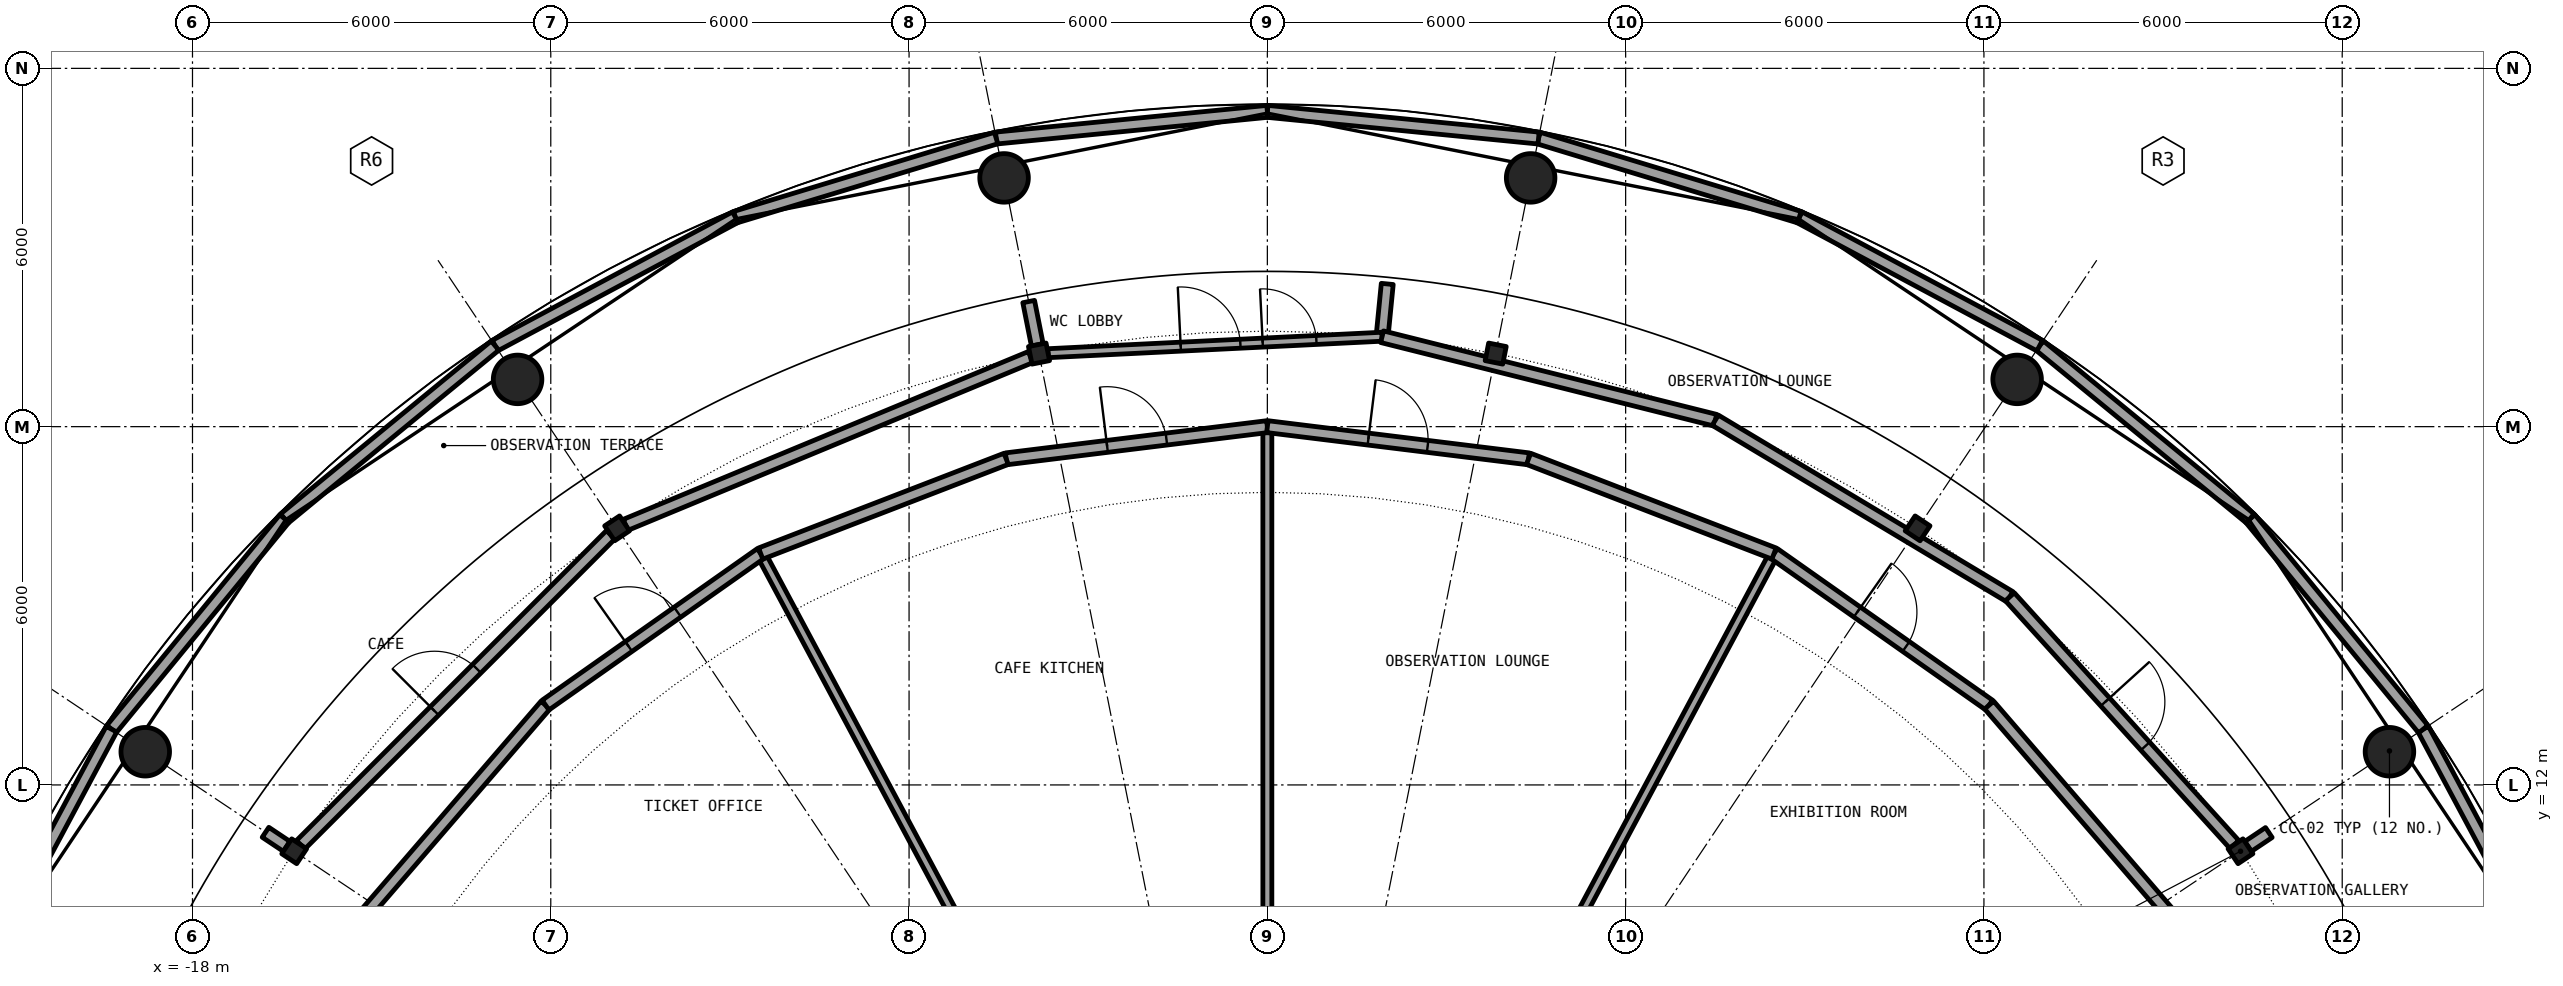
"""IFC4 building model, lengths in metres.
Left out: names, types, materials, properties, quantities, classifications, styles, units other than length and angle.
Written with IfcOpenShell. Run it as: python <this file> out.ifc"""

import sys

from ifc_helpers import new_model, si_unit, direction, frame, frame_2d, origin, origin_2d, place, context, subcontext, project, spatial, rectangle, hollow_circle, i_section, extrude, element, fill, save


model = new_model("IFC4")
c1 = context("Model", 3, precision=1e-05, world=origin(), true_north=direction((0.0, 1.0)))
c2 = subcontext(c1, "Body", "Model", "MODEL_VIEW")
j1 = project(units=[si_unit("LENGTHUNIT", "METRE"), si_unit("PLANEANGLEUNIT", "RADIAN")], contexts=[c1])
p1 = place(None, origin())
s1 = spatial("IfcSite", under=j1, at=p1, CompositionType="ELEMENT")
p2 = place(p1, origin())
s2 = spatial("IfcBuilding", under=s1, at=p2, CompositionType="ELEMENT")
p3 = place(p2, frame((0.0, 0.0, 255.4)))
s3 = spatial("IfcBuildingStorey", under=s2, at=p3, CompositionType="ELEMENT", Elevation=255.4)
for number, where, z_axis, x_axis in (
    (1, (18.791, 12.556, 0.0), (0.0, 0.0, 1.0), (1.0, 0.0, 0.0)),
    (2, (12.556, 18.791, 0.0), (0.0, 0.0, 1.0), (1.0, 0.0, 0.0)),
    (3, (4.409, 22.166, 0.0), (0.0, 0.0, 1.0), (1.0, 0.0, 0.0)),
    (4, (-4.409, 22.166, 0.0), (0.0, 0.0, 1.0), (1.0, 0.0, 0.0)),
    (5, (-12.556, 18.791, 0.0), (0.0, 0.0, 1.0), (1.0, 0.0, 0.0)),
    (6, (-18.791, 12.556, 0.0), (0.0, 0.0, 1.0), (1.0, 0.0, 0.0)),
):
    element("IfcColumn", number, at=place(p3, frame(where, z_axis=z_axis, x_axis=x_axis)), inside=s3, PredefinedType="COLUMN", context=c2, shape_type="SweptSolid", body=[
        extrude(hollow_circle(Radius=0.406, WallThickness=0.03, at=origin_2d()), origin(), (0.0, 0.0, 1.0), 6.1),
    ])
for number, where, z_axis, x_axis in (
    (7, (16.297, 10.889, 0.0), (0.0, 0.0, 1.0), (0.831, 0.556, 0.0)),
    (8, (10.889, 16.297, 0.0), (0.0, 0.0, 1.0), (0.556, 0.831, 0.0)),
    (9, (3.824, 19.223, 0.0), (0.0, 0.0, 1.0), (0.195, 0.981, 0.0)),
    (10, (-3.824, 19.223, 0.0), (0.0, 0.0, 1.0), (-0.195, 0.981, 0.0)),
    (11, (-10.889, 16.297, 0.0), (0.0, 0.0, 1.0), (-0.556, 0.831, 0.0)),
    (12, (-16.297, 10.889, 0.0), (0.0, 0.0, 1.0), (-0.831, 0.556, 0.0)),
):
    element("IfcColumn", number, at=place(p3, frame(where, z_axis=z_axis, x_axis=x_axis)), inside=s3, PredefinedType="COLUMN", context=c2, shape_type="SweptSolid", body=[
        extrude(i_section(OverallWidth=0.3, OverallDepth=0.3, WebThickness=0.011, FlangeThickness=0.019, FilletRadius=0.027, at=origin_2d()), origin(), (0.0, 0.0, 1.0), 6.1),
    ])
p4 = place(p3, frame((21.508, 8.909, 6.1), z_axis=(0.0, 0.0, 1.0), x_axis=(-0.471334945511, 0.881954289711, 0.0)))
e13 = element("IfcWall", 13, at=p4, inside=s3, PredefinedType="PARAPET", context=c2, shape_type="SweptSolid", body=[
    extrude(rectangle(XDim=4.564, YDim=0.2, at=frame_2d((2.282, 0.0))), origin(), (0.0, 0.0, 1.0), 1.1),
])
for number, where, z_axis, x_axis in (
    (14, (19.357, 12.934, 6.1), (0.0, 0.0, 1.0), (-0.635, 0.773, 0.0)),
    (15, (16.461, 16.461, 6.1), (0.0, 0.0, 1.0), (-0.773, 0.635, 0.0)),
):
    element("IfcWall", number, at=place(p3, frame(where, z_axis=z_axis, x_axis=x_axis)), inside=s3, PredefinedType="PARAPET", context=c2, shape_type="SweptSolid", body=[
        extrude(rectangle(XDim=4.563, YDim=0.2, at=frame_2d((2.282, 0.0))), origin(), (0.0, 0.0, 1.0), 1.1),
    ])
p5 = place(p3, frame((12.934, 19.357, 6.1), z_axis=(0.0, 0.0, 1.0), x_axis=(-0.881954289711, 0.471334945511, 0.0)))
e16 = element("IfcWall", 16, at=p5, inside=s3, PredefinedType="PARAPET", context=c2, shape_type="SweptSolid", body=[
    extrude(rectangle(XDim=4.564, YDim=0.2, at=frame_2d((2.282, 0.0))), origin(), (0.0, 0.0, 1.0), 1.1),
])
p6 = place(p3, frame((8.909, 21.508, 6.1), z_axis=(0.0, 0.0, 1.0), x_axis=(-0.956924910545, 0.29033552242, 0.0)))
e17 = element("IfcWall", 17, at=p6, inside=s3, PredefinedType="PARAPET", context=c2, shape_type="SweptSolid", body=[
    extrude(rectangle(XDim=4.563, YDim=0.2, at=frame_2d((2.282, 0.0))), origin(), (0.0, 0.0, 1.0), 1.1),
])
for number, where, z_axis, x_axis in (
    (18, (4.542, 22.833, 6.1), (0.0, 0.0, 1.0), (-0.995, 0.098, 0.0)),
    (19, (0.0, 23.28, 6.1), (0.0, 0.0, 1.0), (-0.995, -0.098, 0.0)),
):
    element("IfcWall", number, at=place(p3, frame(where, z_axis=z_axis, x_axis=x_axis)), inside=s3, PredefinedType="PARAPET", context=c2, shape_type="SweptSolid", body=[
        extrude(rectangle(XDim=4.564, YDim=0.2, at=frame_2d((2.282, 0.0))), origin(), (0.0, 0.0, 1.0), 1.1),
    ])
p7 = place(p3, frame((-4.542, 22.833, 6.1), z_axis=(0.0, 0.0, 1.0), x_axis=(-0.956924910545, -0.29033552242, 0.0)))
e20 = element("IfcWall", 20, at=p7, inside=s3, PredefinedType="PARAPET", context=c2, shape_type="SweptSolid", body=[
    extrude(rectangle(XDim=4.563, YDim=0.2, at=frame_2d((2.282, 0.0))), origin(), (0.0, 0.0, 1.0), 1.1),
])
p8 = place(p3, frame((-8.909, 21.508, 6.1), z_axis=(0.0, 0.0, 1.0), x_axis=(-0.881954289711, -0.471334945511, 0.0)))
e21 = element("IfcWall", 21, at=p8, inside=s3, PredefinedType="PARAPET", context=c2, shape_type="SweptSolid", body=[
    extrude(rectangle(XDim=4.564, YDim=0.2, at=frame_2d((2.282, 0.0))), origin(), (0.0, 0.0, 1.0), 1.1),
])
for number, where, z_axis, x_axis in (
    (22, (-12.934, 19.357, 6.1), (0.0, 0.0, 1.0), (-0.773, -0.635, 0.0)),
    (23, (-16.461, 16.461, 6.1), (0.0, 0.0, 1.0), (-0.635, -0.773, 0.0)),
):
    element("IfcWall", number, at=place(p3, frame(where, z_axis=z_axis, x_axis=x_axis)), inside=s3, PredefinedType="PARAPET", context=c2, shape_type="SweptSolid", body=[
        extrude(rectangle(XDim=4.563, YDim=0.2, at=frame_2d((2.282, 0.0))), origin(), (0.0, 0.0, 1.0), 1.1),
    ])
p9 = place(p3, frame((-19.357, 12.934, 6.1), z_axis=(0.0, 0.0, 1.0), x_axis=(-0.471334945511, -0.881954289711, 0.0)))
e24 = element("IfcWall", 24, at=p9, inside=s3, PredefinedType="PARAPET", context=c2, shape_type="SweptSolid", body=[
    extrude(rectangle(XDim=4.564, YDim=0.2, at=frame_2d((2.282, 0.0))), origin(), (0.0, 0.0, 1.0), 1.1),
])
p10 = place(p3, frame((-3.997, 20.095, 0.0), z_axis=(0.0, 0.0, 1.0), x_axis=(0.194908923467, -0.98082134538, 0.0)))
e25 = element("IfcWall", 25, at=p10, inside=s3, PredefinedType="PARTITIONING", context=c2, shape_type="SweptSolid", body=[
    extrude(rectangle(XDim=0.739, YDim=0.2, at=frame_2d((0.37, 0.0))), origin(), (0.0, 0.0, 1.0), 5.75),
])
p11 = place(p3, frame((-16.777, 11.207, 0.0), z_axis=(0.0, 0.0, 1.0), x_axis=(0.831962011971, -0.554832596949, 0.0)))
e26 = element("IfcWall", 26, at=p11, inside=s3, PredefinedType="PARTITIONING", context=c2, shape_type="SweptSolid", body=[
    extrude(rectangle(XDim=0.426, YDim=0.2, at=frame_2d((0.213, 0.0))), origin(), (0.0, 0.0, 1.0), 5.75),
])
p12 = place(p3, frame((-8.485, 15.875, 0.0), z_axis=(0.0, 0.0, 1.0), x_axis=(0.471384277318, -0.881927923981, 0.0)))
e27 = element("IfcWall", 27, at=p12, inside=s3, PredefinedType="PARTITIONING", context=c2, shape_type="SweptSolid", body=[
    extrude(rectangle(XDim=10.281, YDim=0.15, at=frame_2d((5.14, 0.0))), origin(), (0.0, 0.0, 1.0), 5.75),
])
p13 = place(p3, frame((0.0, 7.72, 0.0), z_axis=(0.0, 0.0, 1.0), x_axis=(0.0, 1.0, 0.0)))
e28 = element("IfcWall", 28, at=p13, inside=s3, PredefinedType="PARTITIONING", context=c2, shape_type="SweptSolid", body=[
    extrude(rectangle(XDim=10.28, YDim=0.15, at=frame_2d((5.14, 0.0))), origin(), (0.0, 0.0, 1.0), 5.75),
])
p14 = place(p3, frame((1.921, 19.506, 0.0), z_axis=(0.0, 0.0, 1.0), x_axis=(0.098142687883, 0.995172353321, 0.0)))
e29 = element("IfcWall", 29, at=p14, inside=s3, PredefinedType="PARTITIONING", context=c2, shape_type="SweptSolid", body=[
    extrude(rectangle(XDim=0.888, YDim=0.2, at=frame_2d((0.444, 0.0))), origin(), (0.0, 0.0, 1.0), 5.75),
])
p15 = place(p3, frame((3.639, 6.808, 0.0), z_axis=(0.0, 0.0, 1.0), x_axis=(0.471384277318, 0.881927923981, 0.0)))
e30 = element("IfcWall", 30, at=p15, inside=s3, PredefinedType="PARTITIONING", context=c2, shape_type="SweptSolid", body=[
    extrude(rectangle(XDim=10.281, YDim=0.15, at=frame_2d((5.14, 0.0))), origin(), (0.0, 0.0, 1.0), 5.75),
])
p16 = place(p3, frame((16.423, 10.97, 0.0), z_axis=(0.0, 0.0, 1.0), x_axis=(0.830972164162, 0.556313996218, 0.0)))
e31 = element("IfcWall", 31, at=p16, inside=s3, PredefinedType="PARTITIONING", context=c2, shape_type="SweptSolid", body=[
    extrude(rectangle(XDim=0.419, YDim=0.2, at=frame_2d((0.209, 0.0))), origin(), (0.0, 0.0, 1.0), 5.75),
])
p17 = place(p3, frame((-15.613, 9.25, 0.0), z_axis=(0.0, 0.0, 1.0), x_axis=(0.653146301984, 0.757231740093, 0.0)))
e32 = element("IfcWall", 32, at=p17, inside=s3, PredefinedType="PARTITIONING", context=c2, shape_type="SweptSolid", body=[
    extrude(rectangle(XDim=5.397, YDim=0.2, at=frame_2d((2.699, 0.0))), origin(), (0.0, 0.0, 1.0), 5.75),
])
p18 = place(p3, frame((-12.088, 13.337, 0.0), z_axis=(0.0, 0.0, 1.0), x_axis=(0.817507922666, 0.575917352038, 0.0)))
e33 = element("IfcWall", 33, at=p18, inside=s3, PredefinedType="PARTITIONING", context=c2, shape_type="SweptSolid", body=[
    extrude(rectangle(XDim=4.407, YDim=0.2, at=frame_2d((2.204, 0.0))), origin(), (0.0, 0.0, 1.0), 5.75),
])
p19 = place(p18, frame((1.704, 0.0, 0.0)))
e34 = element("IfcOpeningElement", 34, at=p19, cuts=e33, PredefinedType="OPENING", context=c2, shape_type="SweptSolid", body=[
    extrude(rectangle(XDim=1.0, YDim=2.3, at=frame_2d((0.5, 1.15))), frame((0.0, 0.11, 0.0), z_axis=(0.0, -1.0, 0.0), x_axis=(1.0, 0.0, 0.0)), (0.0, 0.0, 1.0), 0.22),
])
p20 = place(p3, frame((-4.374, 17.461, 0.0), z_axis=(0.0, 0.0, 1.0), x_axis=(0.992491158779, 0.122316391973, 0.0)))
e35 = element("IfcWall", 35, at=p20, inside=s3, PredefinedType="PARTITIONING", context=c2, shape_type="SweptSolid", body=[
    extrude(rectangle(XDim=4.407, YDim=0.2, at=frame_2d((2.204, 0.0))), origin(), (0.0, 0.0, 1.0), 5.75),
])
p21 = place(p20, frame((1.704, 0.0, 0.0)))
e36 = element("IfcOpeningElement", 36, at=p21, cuts=e35, PredefinedType="OPENING", context=c2, shape_type="SweptSolid", body=[
    extrude(rectangle(XDim=1.0, YDim=2.3, at=frame_2d((0.5, 1.15))), frame((0.0, 0.11, 0.0), z_axis=(0.0, -1.0, 0.0), x_axis=(1.0, 0.0, 0.0)), (0.0, 0.0, 1.0), 0.22),
])
p22 = place(p3, frame((0.0, 18.0, 0.0), z_axis=(0.0, 0.0, 1.0), x_axis=(0.992491158779, -0.122316391973, 0.0)))
e37 = element("IfcWall", 37, at=p22, inside=s3, PredefinedType="PARTITIONING", context=c2, shape_type="SweptSolid", body=[
    extrude(rectangle(XDim=4.407, YDim=0.2, at=frame_2d((2.204, 0.0))), origin(), (0.0, 0.0, 1.0), 5.75),
])
p23 = place(p22, frame((1.704, 0.0, 0.0)))
e38 = element("IfcOpeningElement", 38, at=p23, cuts=e37, PredefinedType="OPENING", context=c2, shape_type="SweptSolid", body=[
    extrude(rectangle(XDim=1.0, YDim=2.3, at=frame_2d((0.5, 1.15))), frame((0.0, 0.11, 0.0), z_axis=(0.0, -1.0, 0.0), x_axis=(1.0, 0.0, 0.0)), (0.0, 0.0, 1.0), 0.22),
])
p24 = place(p3, frame((8.485, 15.875, 0.0), z_axis=(0.0, 0.0, 1.0), x_axis=(0.817507922666, -0.575917352038, 0.0)))
e39 = element("IfcWall", 39, at=p24, inside=s3, PredefinedType="PARTITIONING", context=c2, shape_type="SweptSolid", body=[
    extrude(rectangle(XDim=4.407, YDim=0.2, at=frame_2d((2.204, 0.0))), origin(), (0.0, 0.0, 1.0), 5.75),
])
p25 = place(p24, frame((1.704, 0.0, 0.0)))
e40 = element("IfcOpeningElement", 40, at=p25, cuts=e39, PredefinedType="OPENING", context=c2, shape_type="SweptSolid", body=[
    extrude(rectangle(XDim=1.0, YDim=2.3, at=frame_2d((0.5, 1.15))), frame((0.0, 0.11, 0.0), z_axis=(0.0, -1.0, 0.0), x_axis=(1.0, 0.0, 0.0)), (0.0, 0.0, 1.0), 0.22),
])
p26 = place(p3, frame((12.088, 13.337, 0.0), z_axis=(0.0, 0.0, 1.0), x_axis=(0.653146301984, -0.757231740093, 0.0)))
e41 = element("IfcWall", 41, at=p26, inside=s3, PredefinedType="PARTITIONING", context=c2, shape_type="SweptSolid", body=[
    extrude(rectangle(XDim=5.397, YDim=0.2, at=frame_2d((2.699, 0.0))), origin(), (0.0, 0.0, 1.0), 5.75),
])
for number, where, z_axis, x_axis in (
    (42, (-8.485, 15.875, 0.0), (0.0, 0.0, 1.0), (0.933, 0.36, 0.0)),
    (43, (4.374, 17.461, 0.0), (0.0, 0.0, 1.0), (0.933, -0.36, 0.0)),
):
    element("IfcWall", number, at=place(p3, frame(where, z_axis=z_axis, x_axis=x_axis)), inside=s3, PredefinedType="PARTITIONING", context=c2, shape_type="SweptSolid", body=[
        extrude(rectangle(XDim=4.406, YDim=0.2, at=frame_2d((2.203, 0.0))), origin(), (0.0, 0.0, 1.0), 5.75),
    ])
p27 = place(p3, frame((-16.189, 10.997, 0.0), z_axis=(0.0, 0.0, 1.0), x_axis=(0.707106781187, 0.707106781187, 0.0)))
e44 = element("IfcWall", 44, at=p27, inside=s3, PredefinedType="PARTITIONING", context=c2, shape_type="SweptSolid", body=[
    extrude(rectangle(XDim=7.343, YDim=0.2, at=frame_2d((3.671, 0.0))), origin(), (0.0, 0.0, 1.0), 5.5),
])
p28 = place(p27, frame((3.171, 0.0, 0.0)))
e45 = element("IfcOpeningElement", 45, at=p28, cuts=e44, PredefinedType="OPENING", context=c2, shape_type="SweptSolid", body=[
    extrude(rectangle(XDim=1.0, YDim=2.3, at=frame_2d((0.5, 1.15))), frame((0.0, 0.11, 0.0), z_axis=(0.0, -1.0, 0.0), x_axis=(1.0, 0.0, 0.0)), (0.0, 0.0, 1.0), 0.22),
])
p29 = place(p3, frame((-10.748, 16.355, 0.0), z_axis=(0.0, 0.0, 1.0), x_axis=(0.923857139404, 0.382737489635, 0.0)))
e46 = element("IfcWall", 46, at=p29, inside=s3, PredefinedType="PARTITIONING", context=c2, shape_type="SweptSolid", body=[
    extrude(rectangle(XDim=7.342, YDim=0.2, at=frame_2d((3.671, 0.0))), origin(), (0.0, 0.0, 1.0), 5.5),
])
p30 = place(p3, frame((-3.672, 19.23, 0.0), z_axis=(0.0, 0.0, 1.0), x_axis=(0.998783562084, 0.049309188909, 0.0)))
e47 = element("IfcWall", 47, at=p30, inside=s3, PredefinedType="PARTITIONING", context=c2, shape_type="SweptSolid", body=[
    extrude(rectangle(XDim=5.6, YDim=0.15, at=frame_2d((2.8, 0.0))), origin(), (0.0, 0.0, 1.0), 5.5),
])
p31 = place(p30, frame((2.224, 0.0, 0.0)))
e48 = element("IfcOpeningElement", 48, at=p31, cuts=e47, PredefinedType="OPENING", context=c2, shape_type="SweptSolid", body=[
    extrude(rectangle(XDim=1.0, YDim=2.3, at=frame_2d((0.5, 1.15))), frame((0.0, 0.085, 0.0), z_axis=(0.0, -1.0, 0.0), x_axis=(1.0, 0.0, 0.0)), (0.0, 0.0, 1.0), 0.17),
])
p32 = place(p30, frame((3.598, 0.0, 0.0)))
e49 = element("IfcOpeningElement", 49, at=p32, cuts=e47, PredefinedType="OPENING", context=c2, shape_type="SweptSolid", body=[
    extrude(rectangle(XDim=0.9, YDim=2.3, at=frame_2d((0.45, 1.15))), frame((0.0, 0.085, 0.0), z_axis=(0.0, -1.0, 0.0), x_axis=(1.0, 0.0, 0.0)), (0.0, 0.0, 1.0), 0.17),
])
p33 = place(p3, frame((1.921, 19.506, 0.0), z_axis=(0.0, 0.0, 1.0), x_axis=(0.970012544183, -0.243054858266, 0.0)))
e50 = element("IfcWall", 50, at=p33, inside=s3, PredefinedType="PARTITIONING", context=c2, shape_type="SweptSolid", body=[
    extrude(rectangle(XDim=5.753, YDim=0.2, at=frame_2d((2.876, 0.0))), origin(), (0.0, 0.0, 1.0), 5.5),
])
p34 = place(p3, frame((7.501, 18.108, 0.0), z_axis=(0.0, 0.0, 1.0), x_axis=(0.857710084627, -0.514133650648, 0.0)))
e51 = element("IfcWall", 51, at=p34, inside=s3, PredefinedType="PARTITIONING", context=c2, shape_type="SweptSolid", body=[
    extrude(rectangle(XDim=5.751, YDim=0.2, at=frame_2d((2.876, 0.0))), origin(), (0.0, 0.0, 1.0), 5.5),
])
p35 = place(p3, frame((12.434, 15.151, 0.0), z_axis=(0.0, 0.0, 1.0), x_axis=(0.671532887857, -0.740974750262, 0.0)))
e52 = element("IfcWall", 52, at=p35, inside=s3, PredefinedType="PARTITIONING", context=c2, shape_type="SweptSolid", body=[
    extrude(rectangle(XDim=5.601, YDim=0.2, at=frame_2d((2.8, 0.0))), origin(), (0.0, 0.0, 1.0), 5.5),
])
p36 = place(p35, frame((2.377, 0.0, 0.0)))
e53 = element("IfcOpeningElement", 53, at=p36, cuts=e52, PredefinedType="OPENING", context=c2, shape_type="SweptSolid", body=[
    extrude(rectangle(XDim=1.0, YDim=2.3, at=frame_2d((0.5, 1.15))), frame((0.0, 0.11, 0.0), z_axis=(0.0, -1.0, 0.0), x_axis=(1.0, 0.0, 0.0)), (0.0, 0.0, 1.0), 0.22),
])
p37 = place(p3, frame((0.0, 0.0, 5.75)))
p38 = place(p37, frame((11.075, 19.182, 0.0)))
p39 = place(p38, frame((0.0, 0.0, 0.3)))
e54 = element("IfcWindow", 54, at=p39, inside=s3, PartitioningType="SINGLE_PANEL", PredefinedType="SKYLIGHT", context=c2, shape_type="SweptSolid", body=[
    extrude(rectangle(XDim=1.0, YDim=1.0, at=origin_2d()), origin(), (0.0, 0.0, 1.0), 0.05),
])
p40 = place(p37, frame((-11.075, 19.182, 0.0)))
p41 = place(p40, frame((0.0, 0.0, 0.3)))
e55 = element("IfcWindow", 55, at=p41, inside=s3, PartitioningType="SINGLE_PANEL", PredefinedType="SKYLIGHT", context=c2, shape_type="SweptSolid", body=[
    extrude(rectangle(XDim=1.0, YDim=1.0, at=origin_2d()), origin(), (0.0, 0.0, 1.0), 0.05),
])
p42 = place(p31, origin())
e56 = element("IfcDoor", 56, at=p42, inside=s3, OperationType="SINGLE_SWING_LEFT", PredefinedType="DOOR", context=c2, shape_type="SweptSolid", body=[
    extrude(rectangle(XDim=1.0, YDim=2.3, at=frame_2d((0.5, 1.15))), frame((0.0, 0.025, 0.0), z_axis=(0.0, -1.0, 0.0), x_axis=(1.0, 0.0, 0.0)), (0.0, 0.0, 1.0), 0.05),
])
fill(e48, e56)
p43 = place(p36, origin())
e57 = element("IfcDoor", 57, at=p43, inside=s3, OperationType="SINGLE_SWING_RIGHT", PredefinedType="DOOR", context=c2, shape_type="SweptSolid", body=[
    extrude(rectangle(XDim=1.0, YDim=2.3, at=frame_2d((0.5, 1.15))), frame((0.0, 0.025, 0.0), z_axis=(0.0, -1.0, 0.0), x_axis=(1.0, 0.0, 0.0)), (0.0, 0.0, 1.0), 0.05),
])
fill(e53, e57)
p44 = place(p28, origin())
e58 = element("IfcDoor", 58, at=p44, inside=s3, OperationType="SINGLE_SWING_RIGHT", PredefinedType="DOOR", context=c2, shape_type="SweptSolid", body=[
    extrude(rectangle(XDim=1.0, YDim=2.3, at=frame_2d((0.5, 1.15))), frame((0.0, 0.025, 0.0), z_axis=(0.0, -1.0, 0.0), x_axis=(1.0, 0.0, 0.0)), (0.0, 0.0, 1.0), 0.05),
])
fill(e45, e58)
p45 = place(p25, origin())
e59 = element("IfcDoor", 59, at=p45, inside=s3, OperationType="SINGLE_SWING_LEFT", PredefinedType="DOOR", context=c2, shape_type="SweptSolid", body=[
    extrude(rectangle(XDim=1.0, YDim=2.3, at=frame_2d((0.5, 1.15))), frame((0.0, 0.025, 0.0), z_axis=(0.0, -1.0, 0.0), x_axis=(1.0, 0.0, 0.0)), (0.0, 0.0, 1.0), 0.05),
])
fill(e40, e59)
p46 = place(p23, origin())
e60 = element("IfcDoor", 60, at=p46, inside=s3, OperationType="SINGLE_SWING_LEFT", PredefinedType="DOOR", context=c2, shape_type="SweptSolid", body=[
    extrude(rectangle(XDim=1.0, YDim=2.3, at=frame_2d((0.5, 1.15))), frame((0.0, 0.025, 0.0), z_axis=(0.0, -1.0, 0.0), x_axis=(1.0, 0.0, 0.0)), (0.0, 0.0, 1.0), 0.05),
])
fill(e38, e60)
p47 = place(p21, origin())
e61 = element("IfcDoor", 61, at=p47, inside=s3, OperationType="SINGLE_SWING_RIGHT", PredefinedType="DOOR", context=c2, shape_type="SweptSolid", body=[
    extrude(rectangle(XDim=1.0, YDim=2.3, at=frame_2d((0.5, 1.15))), frame((0.0, 0.025, 0.0), z_axis=(0.0, -1.0, 0.0), x_axis=(1.0, 0.0, 0.0)), (0.0, 0.0, 1.0), 0.05),
])
fill(e36, e61)
p48 = place(p19, origin())
e62 = element("IfcDoor", 62, at=p48, inside=s3, OperationType="SINGLE_SWING_RIGHT", PredefinedType="DOOR", context=c2, shape_type="SweptSolid", body=[
    extrude(rectangle(XDim=1.0, YDim=2.3, at=frame_2d((0.5, 1.15))), frame((0.0, 0.025, 0.0), z_axis=(0.0, -1.0, 0.0), x_axis=(1.0, 0.0, 0.0)), (0.0, 0.0, 1.0), 0.05),
])
fill(e34, e62)
p49 = place(p32, origin())
e63 = element("IfcDoor", 63, at=p49, inside=s3, OperationType="SINGLE_SWING_RIGHT", PredefinedType="DOOR", context=c2, shape_type="SweptSolid", body=[
    extrude(rectangle(XDim=0.9, YDim=2.3, at=frame_2d((0.45, 1.15))), frame((0.0, 0.025, 0.0), z_axis=(0.0, -1.0, 0.0), x_axis=(1.0, 0.0, 0.0)), (0.0, 0.0, 1.0), 0.05),
])
fill(e49, e63)
save(model, sys.argv[1])
